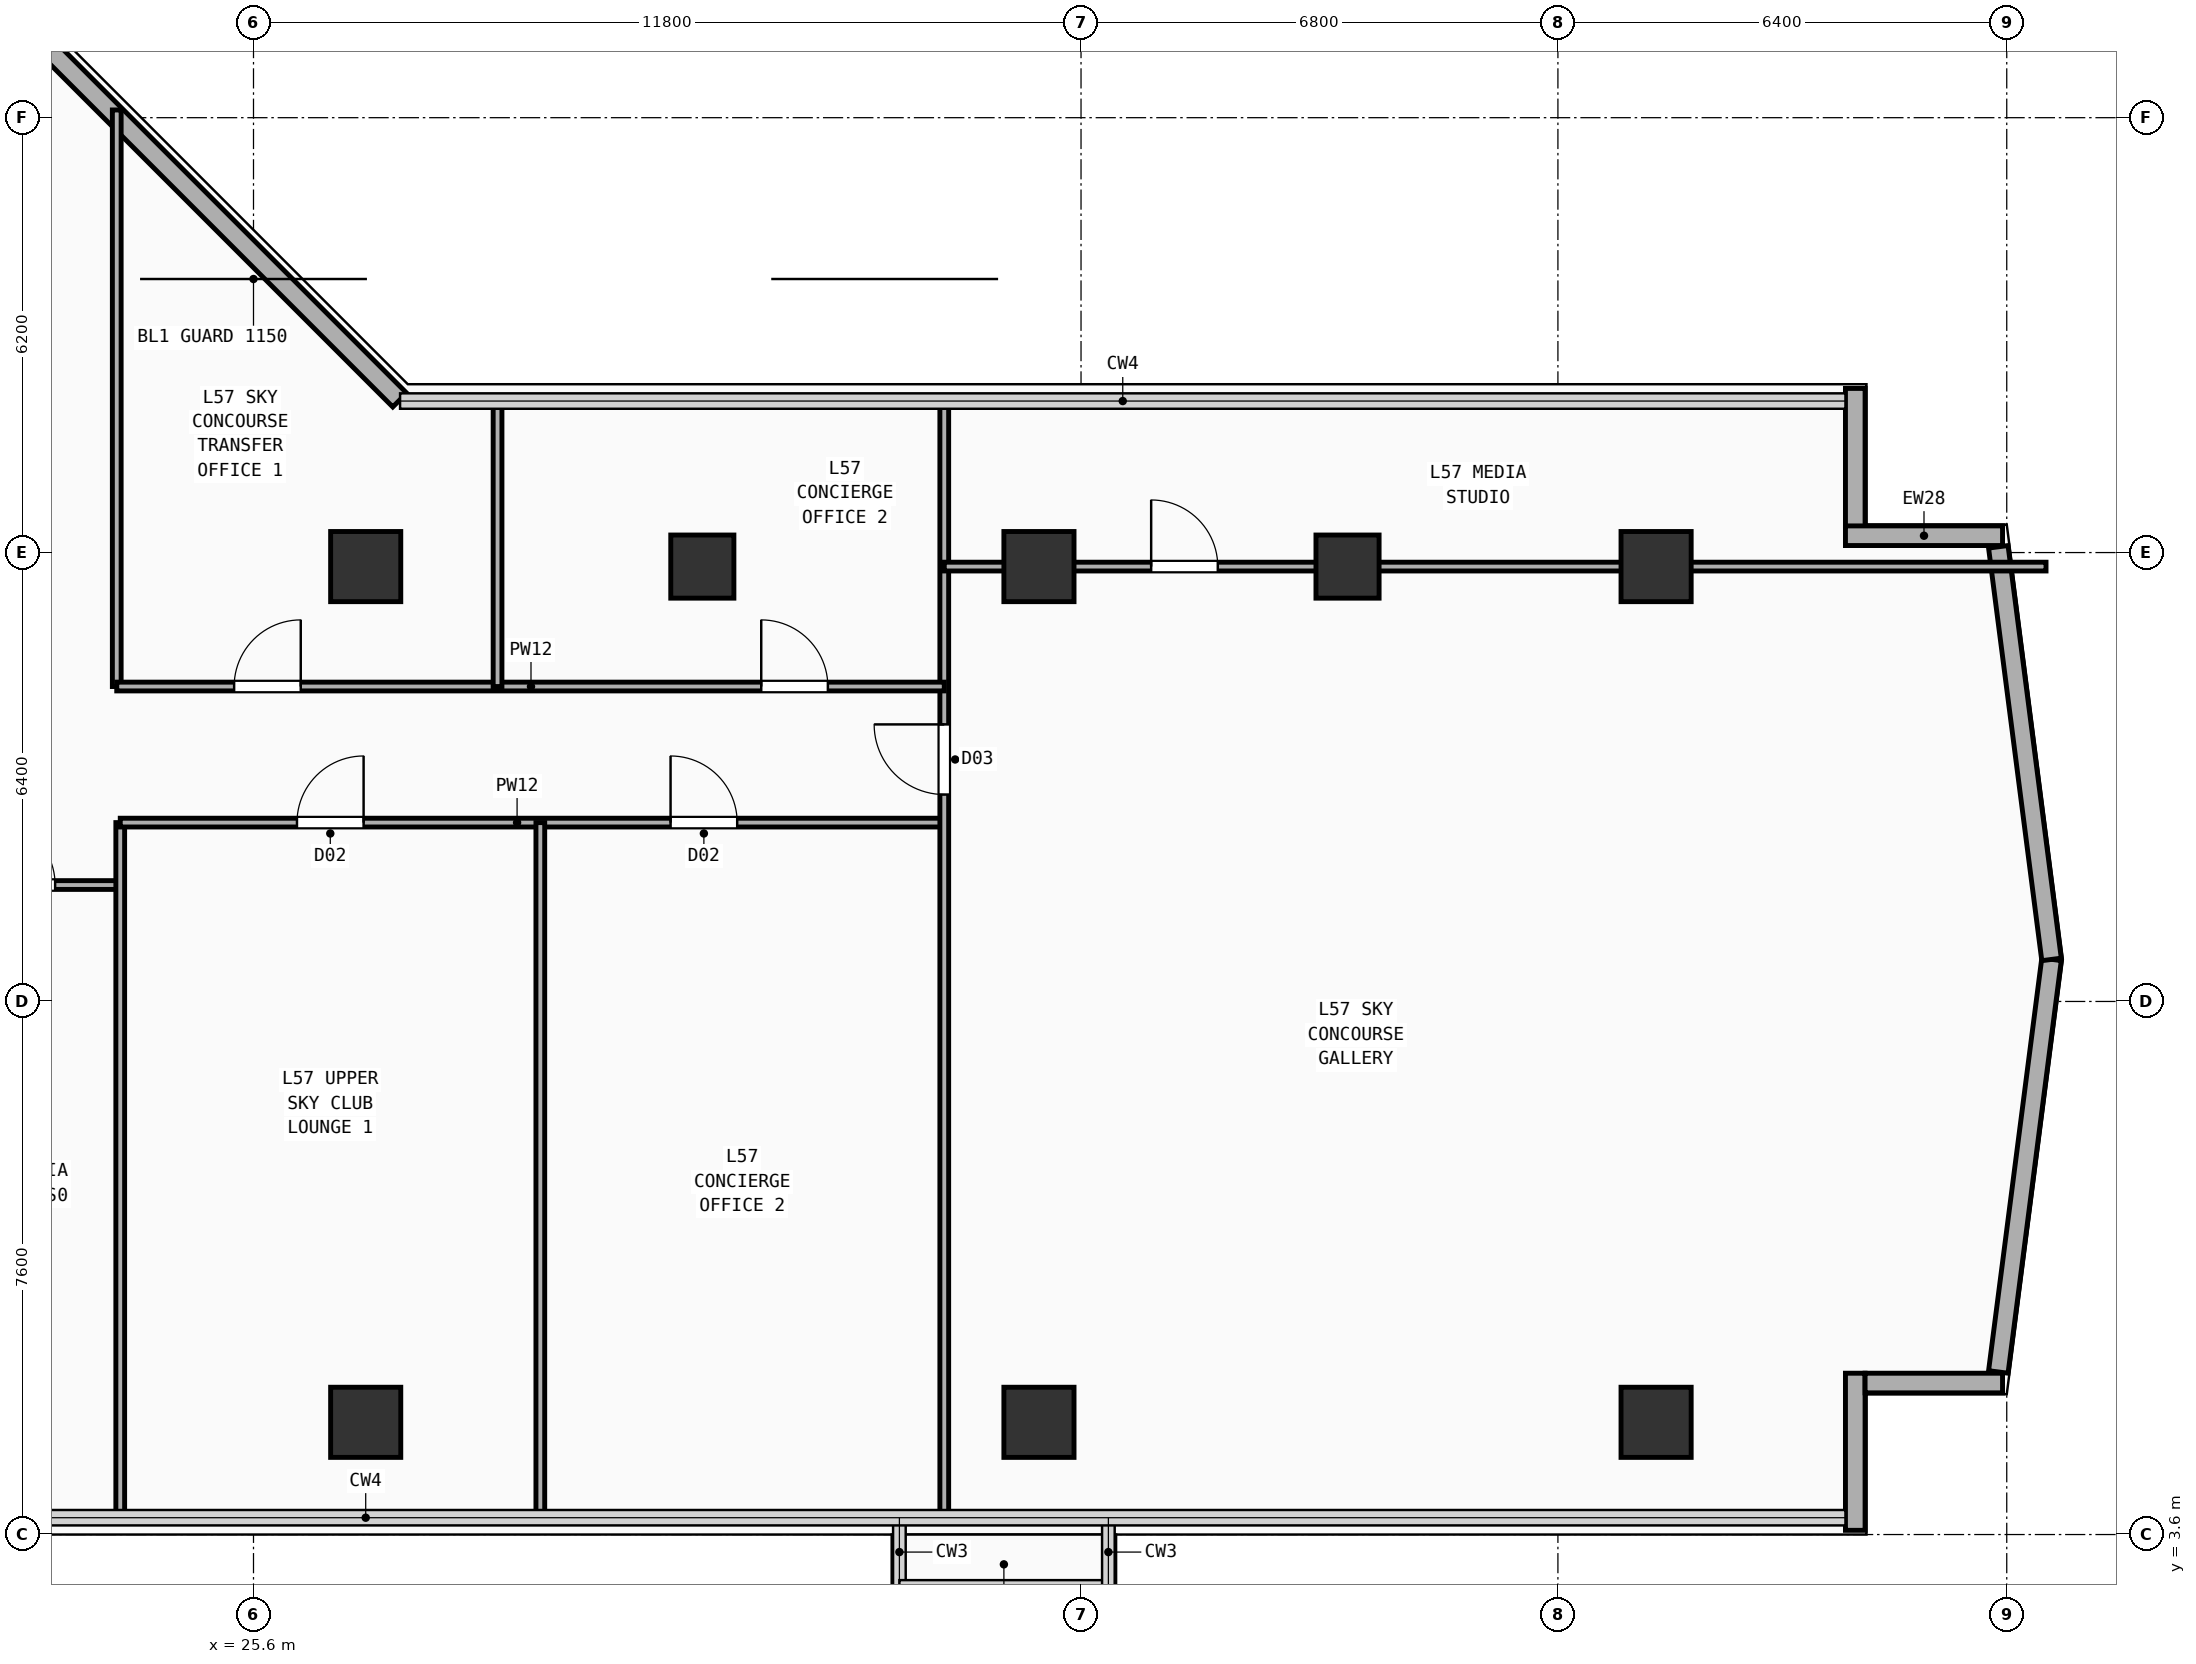
"""IFC4 building model, lengths in metres.
Left out: names, types, materials, properties, quantities, classifications, styles, units other than length and angle.
Written with IfcOpenShell. Run it as: python <this file> out.ifc"""

import sys

from ifc_helpers import new_model, si_unit, direction, frame, frame_2d, origin, origin_2d, place, context, subcontext, project, spatial, rectangle, extrude, element, fill, save


model = new_model("IFC4")
c1 = context("Model", 3, precision=1e-05, world=origin(), true_north=direction((0.0, 1.0)))
c2 = subcontext(c1, "Body", "Model", "MODEL_VIEW")
j1 = project(units=[si_unit("LENGTHUNIT", "METRE"), si_unit("PLANEANGLEUNIT", "RADIAN")], contexts=[c1])
p1 = place(None, origin())
s1 = spatial("IfcSite", under=j1, at=p1, CompositionType="ELEMENT")
p2 = place(p1, origin())
s2 = spatial("IfcBuilding", under=s1, at=p2, CompositionType="ELEMENT")
p3 = place(p2, frame((0.0, 0.0, 223.5)))
s3 = spatial("IfcBuildingStorey", under=s2, at=p3, CompositionType="ELEMENT", Elevation=223.5)
for number, where, z_axis, x_axis in (
    (1, (27.2, 5.2, 0.0), (0.0, 0.0, 1.0), (1.0, 0.0, 0.0)),
    (2, (36.8, 5.2, 0.0), (0.0, 0.0, 1.0), (1.0, 0.0, 0.0)),
    (3, (45.6, 5.2, 0.0), (0.0, 0.0, 1.0), (1.0, 0.0, 0.0)),
    (4, (27.2, 17.4, 0.0), (0.0, 0.0, 1.0), (1.0, 0.0, 0.0)),
    (5, (36.8, 17.4, 0.0), (0.0, 0.0, 1.0), (1.0, 0.0, 0.0)),
    (6, (45.6, 17.4, 0.0), (0.0, 0.0, 1.0), (1.0, 0.0, 0.0)),
):
    element("IfcColumn", number, at=place(p3, frame(where, z_axis=z_axis, x_axis=x_axis)), inside=s3, PredefinedType="COLUMN", context=c2, shape_type="SweptSolid", body=[
        extrude(rectangle(XDim=1.0, YDim=1.0, at=origin_2d()), origin(), (0.0, 0.0, 1.0), 3.56),
    ])
for number, where, z_axis, x_axis in (
    (7, (32.0, 17.4, 0.0), (0.0, 0.0, 1.0), (1.0, 0.0, 0.0)),
    (8, (41.2, 17.4, 0.0), (0.0, 0.0, 1.0), (1.0, 0.0, 0.0)),
):
    element("IfcColumn", number, at=place(p3, frame(where, z_axis=z_axis, x_axis=x_axis)), inside=s3, PredefinedType="COLUMN", context=c2, shape_type="SweptSolid", body=[
        extrude(rectangle(XDim=0.9, YDim=0.9, at=origin_2d()), origin(), (0.0, 0.0, 1.0), 3.56),
    ])
p4 = place(p3, frame((48.44, 3.66, 0.0), z_axis=(0.0, 0.0, 1.0), x_axis=(0.0, 1.0, 0.0)))
e9 = element("IfcWall", 9, at=p4, inside=s3, PredefinedType="SOLIDWALL", context=c2, shape_type="SweptSolid", body=[
    extrude(rectangle(XDim=2.24, YDim=0.28, at=frame_2d((1.12, 0.0))), origin(), (0.0, 0.0, 1.0), 3.56),
])
p5 = place(p3, frame((48.58, 5.76, 0.0), z_axis=(0.0, 0.0, 1.0), x_axis=(1.0, 0.0, 0.0)))
e10 = element("IfcWall", 10, at=p5, inside=s3, PredefinedType="SOLIDWALL", context=c2, shape_type="SweptSolid", body=[
    extrude(rectangle(XDim=1.96, YDim=0.28, at=frame_2d((0.98, 0.0))), origin(), (0.0, 0.0, 1.0), 3.56),
])
p6 = place(p3, frame((48.44, 17.965, 0.0), z_axis=(0.0, 0.0, 1.0), x_axis=(0.0, 1.0, 0.0)))
e11 = element("IfcWall", 11, at=p6, inside=s3, PredefinedType="SOLIDWALL", context=c2, shape_type="SweptSolid", body=[
    extrude(rectangle(XDim=1.975, YDim=0.28, at=frame_2d((0.987, 0.0))), origin(), (0.0, 0.0, 1.0), 3.56),
])
p7 = place(p3, frame((48.3, 17.84, 0.0), z_axis=(0.0, 0.0, 1.0), x_axis=(1.0, 0.0, 0.0)))
e12 = element("IfcWall", 12, at=p7, inside=s3, PredefinedType="SOLIDWALL", context=c2, shape_type="SweptSolid", body=[
    extrude(rectangle(XDim=2.24, YDim=0.28, at=frame_2d((1.12, 0.0))), origin(), (0.0, 0.0, 1.0), 3.56),
])
p8 = place(p3, frame((27.685, 19.775, 0.0), z_axis=(0.0, 0.0, 1.0), x_axis=(-0.707106781187, 0.707106781187, 0.0)))
e13 = element("IfcWall", 13, at=p8, inside=s3, PredefinedType="SOLIDWALL", context=c2, shape_type="SweptSolid", body=[
    extrude(rectangle(XDim=9.207, YDim=0.28, at=frame_2d((4.603, 0.0))), origin(), (0.0, 0.0, 1.0), 3.56),
])
for number, where, z_axis, x_axis in (
    (14, (50.48, 5.918, 0.0), (0.0, 0.0, 1.0), (0.128, 0.992, 0.0)),
    (15, (51.239, 11.799, 0.0), (0.0, 0.0, 1.0), (-0.128, 0.992, 0.0)),
):
    element("IfcWall", number, at=place(p3, frame(where, z_axis=z_axis, x_axis=x_axis)), inside=s3, PredefinedType="SOLIDWALL", context=c2, shape_type="SweptSolid", body=[
        extrude(rectangle(XDim=5.931, YDim=0.28, at=frame_2d((2.966, 0.0))), origin(), (0.0, 0.0, 1.0), 3.56),
    ])
p9 = place(p3, frame((20.85, 12.86, 0.0), z_axis=(0.0, 0.0, 1.0), x_axis=(1.0, 0.0, 0.0)))
e16 = element("IfcWall", 16, at=p9, inside=s3, PredefinedType="PARTITIONING", context=c2, shape_type="SweptSolid", body=[
    extrude(rectangle(XDim=2.85, YDim=0.125, at=frame_2d((1.425, 0.0))), origin(), (0.0, 0.0, 1.0), 3.56),
])
p10 = place(p9, frame((0.971, 0.0, 0.0)))
e17 = element("IfcOpeningElement", 17, at=p10, cuts=e16, PredefinedType="OPENING", context=c2, shape_type="SweptSolid", body=[
    extrude(rectangle(XDim=0.95, YDim=2.15, at=frame_2d((0.475, 1.075))), frame((0.0, 0.073, 0.0), z_axis=(0.0, -1.0, 0.0), x_axis=(1.0, 0.0, 0.0)), (0.0, 0.0, 1.0), 0.145),
])
p11 = place(p3, frame((23.7, 3.84, 0.0), z_axis=(0.0, 0.0, 1.0), x_axis=(0.0, 1.0, 0.0)))
e18 = element("IfcWall", 18, at=p11, inside=s3, PredefinedType="PARTITIONING", context=c2, shape_type="SweptSolid", body=[
    extrude(rectangle(XDim=9.91, YDim=0.125, at=frame_2d((4.955, 0.0))), origin(), (0.0, 0.0, 1.0), 3.56),
])
p12 = place(p3, frame((23.7, 13.75, 0.0), z_axis=(0.0, 0.0, 1.0), x_axis=(1.0, 0.0, 0.0)))
e19 = element("IfcWall", 19, at=p12, inside=s3, PredefinedType="PARTITIONING", context=c2, shape_type="SweptSolid", body=[
    extrude(rectangle(XDim=11.75, YDim=0.125, at=frame_2d((5.875, 0.0))), origin(), (0.0, 0.0, 1.0), 3.2),
])
p13 = place(p12, frame((2.52, 0.0, 0.0)))
e20 = element("IfcOpeningElement", 20, at=p13, cuts=e19, PredefinedType="OPENING", context=c2, shape_type="SweptSolid", body=[
    extrude(rectangle(XDim=0.95, YDim=2.15, at=frame_2d((0.475, 1.075))), frame((0.0, 0.073, 0.0), z_axis=(0.0, -1.0, 0.0), x_axis=(1.0, 0.0, 0.0)), (0.0, 0.0, 1.0), 0.145),
])
p14 = place(p12, frame((7.847, 0.0, 0.0)))
e21 = element("IfcOpeningElement", 21, at=p14, cuts=e19, PredefinedType="OPENING", context=c2, shape_type="SweptSolid", body=[
    extrude(rectangle(XDim=0.95, YDim=2.15, at=frame_2d((0.475, 1.075))), frame((0.0, 0.073, 0.0), z_axis=(0.0, -1.0, 0.0), x_axis=(1.0, 0.0, 0.0)), (0.0, 0.0, 1.0), 0.145),
])
p15 = place(p3, frame((29.69, 3.84, 0.0), z_axis=(0.0, 0.0, 1.0), x_axis=(0.0, 1.0, 0.0)))
e22 = element("IfcWall", 22, at=p15, inside=s3, PredefinedType="PARTITIONING", context=c2, shape_type="SweptSolid", body=[
    extrude(rectangle(XDim=9.91, YDim=0.125, at=frame_2d((4.955, 0.0))), origin(), (0.0, 0.0, 1.0), 3.56),
])
p16 = place(p3, frame((35.45, 3.84, 0.0), z_axis=(0.0, 0.0, 1.0), x_axis=(0.0, 1.0, 0.0)))
e23 = element("IfcWall", 23, at=p16, inside=s3, PredefinedType="PARTITIONING", context=c2, shape_type="SweptSolid", body=[
    extrude(rectangle(XDim=15.92, YDim=0.125, at=frame_2d((7.96, 0.0))), origin(), (0.0, 0.0, 1.0), 3.56),
])
p17 = place(p16, frame((10.31, 0.0, 0.0)))
e24 = element("IfcOpeningElement", 24, at=p17, cuts=e23, PredefinedType="OPENING", context=c2, shape_type="SweptSolid", body=[
    extrude(rectangle(XDim=1.0, YDim=2.2, at=frame_2d((0.5, 1.1))), frame((0.0, 0.073, 0.0), z_axis=(0.0, -1.0, 0.0), x_axis=(1.0, 0.0, 0.0)), (0.0, 0.0, 1.0), 0.145),
])
p18 = place(p3, frame((35.45, 17.4, 0.0), z_axis=(0.0, 0.0, 1.0), x_axis=(1.0, 0.0, 0.0)))
e25 = element("IfcWall", 25, at=p18, inside=s3, PredefinedType="PARTITIONING", context=c2, shape_type="SweptSolid", body=[
    extrude(rectangle(XDim=15.71, YDim=0.125, at=frame_2d((7.855, 0.0))), origin(), (0.0, 0.0, 1.0), 3.26),
])
p19 = place(p18, frame((2.95, 0.0, 0.0)))
e26 = element("IfcOpeningElement", 26, at=p19, cuts=e25, PredefinedType="OPENING", context=c2, shape_type="SweptSolid", body=[
    extrude(rectangle(XDim=0.95, YDim=2.15, at=frame_2d((0.475, 1.075))), frame((0.0, 0.073, 0.0), z_axis=(0.0, -1.0, 0.0), x_axis=(1.0, 0.0, 0.0)), (0.0, 0.0, 1.0), 0.145),
])
p20 = place(p3, frame((23.65, 15.69, 0.0), z_axis=(0.0, 0.0, 1.0), x_axis=(0.0, 1.0, 0.0)))
e27 = element("IfcWall", 27, at=p20, inside=s3, PredefinedType="PARTITIONING", context=c2, shape_type="SweptSolid", body=[
    extrude(rectangle(XDim=8.22, YDim=0.125, at=frame_2d((4.11, 0.0))), origin(), (0.0, 0.0, 1.0), 3.56),
])
p21 = place(p3, frame((23.65, 15.69, 0.0), z_axis=(0.0, 0.0, 1.0), x_axis=(1.0, 0.0, 0.0)))
e28 = element("IfcWall", 28, at=p21, inside=s3, PredefinedType="PARTITIONING", context=c2, shape_type="SweptSolid", body=[
    extrude(rectangle(XDim=11.8, YDim=0.125, at=frame_2d((5.9, 0.0))), origin(), (0.0, 0.0, 1.0), 3.2),
])
p22 = place(p21, frame((1.674, 0.0, 0.0)))
e29 = element("IfcOpeningElement", 29, at=p22, cuts=e28, PredefinedType="OPENING", context=c2, shape_type="SweptSolid", body=[
    extrude(rectangle(XDim=0.95, YDim=2.15, at=frame_2d((0.475, 1.075))), frame((0.0, 0.073, 0.0), z_axis=(0.0, -1.0, 0.0), x_axis=(1.0, 0.0, 0.0)), (0.0, 0.0, 1.0), 0.145),
])
p23 = place(p21, frame((9.19, 0.0, 0.0)))
e30 = element("IfcOpeningElement", 30, at=p23, cuts=e28, PredefinedType="OPENING", context=c2, shape_type="SweptSolid", body=[
    extrude(rectangle(XDim=0.95, YDim=2.15, at=frame_2d((0.475, 1.075))), frame((0.0, 0.073, 0.0), z_axis=(0.0, -1.0, 0.0), x_axis=(1.0, 0.0, 0.0)), (0.0, 0.0, 1.0), 0.145),
])
p24 = place(p3, frame((29.08, 15.69, 0.0), z_axis=(0.0, 0.0, 1.0), x_axis=(0.0, 1.0, 0.0)))
e31 = element("IfcWall", 31, at=p24, inside=s3, PredefinedType="PARTITIONING", context=c2, shape_type="SweptSolid", body=[
    extrude(rectangle(XDim=4.07, YDim=0.125, at=frame_2d((2.035, 0.0))), origin(), (0.0, 0.0, 1.0), 3.56),
])
p25 = place(p10, origin())
e32 = element("IfcDoor", 32, at=p25, inside=s3, OperationType="SINGLE_SWING_LEFT", PredefinedType="DOOR", context=c2, shape_type="SweptSolid", body=[
    extrude(rectangle(XDim=0.95, YDim=2.15, at=frame_2d((0.475, 1.075))), frame((0.0, 0.025, 0.0), z_axis=(0.0, -1.0, 0.0), x_axis=(1.0, 0.0, 0.0)), (0.0, 0.0, 1.0), 0.05),
])
fill(e17, e32)
p26 = place(p13, origin())
e33 = element("IfcDoor", 33, at=p26, inside=s3, OperationType="SINGLE_SWING_RIGHT", PredefinedType="DOOR", context=c2, shape_type="SweptSolid", body=[
    extrude(rectangle(XDim=0.95, YDim=2.15, at=frame_2d((0.475, 1.075))), frame((0.0, 0.025, 0.0), z_axis=(0.0, -1.0, 0.0), x_axis=(1.0, 0.0, 0.0)), (0.0, 0.0, 1.0), 0.05),
])
fill(e20, e33)
p27 = place(p14, origin())
e34 = element("IfcDoor", 34, at=p27, inside=s3, OperationType="SINGLE_SWING_LEFT", PredefinedType="DOOR", context=c2, shape_type="SweptSolid", body=[
    extrude(rectangle(XDim=0.95, YDim=2.15, at=frame_2d((0.475, 1.075))), frame((0.0, 0.025, 0.0), z_axis=(0.0, -1.0, 0.0), x_axis=(1.0, 0.0, 0.0)), (0.0, 0.0, 1.0), 0.05),
])
fill(e21, e34)
p28 = place(p17, origin())
e35 = element("IfcDoor", 35, at=p28, inside=s3, OperationType="SINGLE_SWING_RIGHT", PredefinedType="DOOR", context=c2, shape_type="SweptSolid", body=[
    extrude(rectangle(XDim=1.0, YDim=2.2, at=frame_2d((0.5, 1.1))), frame((0.0, 0.025, 0.0), z_axis=(0.0, -1.0, 0.0), x_axis=(1.0, 0.0, 0.0)), (0.0, 0.0, 1.0), 0.05),
])
fill(e24, e35)
p29 = place(p19, origin())
e36 = element("IfcDoor", 36, at=p29, inside=s3, OperationType="SINGLE_SWING_LEFT", PredefinedType="DOOR", context=c2, shape_type="SweptSolid", body=[
    extrude(rectangle(XDim=0.95, YDim=2.15, at=frame_2d((0.475, 1.075))), frame((0.0, 0.025, 0.0), z_axis=(0.0, -1.0, 0.0), x_axis=(1.0, 0.0, 0.0)), (0.0, 0.0, 1.0), 0.05),
])
fill(e26, e36)
p30 = place(p22, origin())
e37 = element("IfcDoor", 37, at=p30, inside=s3, OperationType="SINGLE_SWING_RIGHT", PredefinedType="DOOR", context=c2, shape_type="SweptSolid", body=[
    extrude(rectangle(XDim=0.95, YDim=2.15, at=frame_2d((0.475, 1.075))), frame((0.0, 0.025, 0.0), z_axis=(0.0, -1.0, 0.0), x_axis=(1.0, 0.0, 0.0)), (0.0, 0.0, 1.0), 0.05),
])
fill(e29, e37)
p31 = place(p23, origin())
e38 = element("IfcDoor", 38, at=p31, inside=s3, OperationType="SINGLE_SWING_LEFT", PredefinedType="DOOR", context=c2, shape_type="SweptSolid", body=[
    extrude(rectangle(XDim=0.95, YDim=2.15, at=frame_2d((0.475, 1.075))), frame((0.0, 0.025, 0.0), z_axis=(0.0, -1.0, 0.0), x_axis=(1.0, 0.0, 0.0)), (0.0, 0.0, 1.0), 0.05),
])
fill(e30, e38)
save(model, sys.argv[1])
